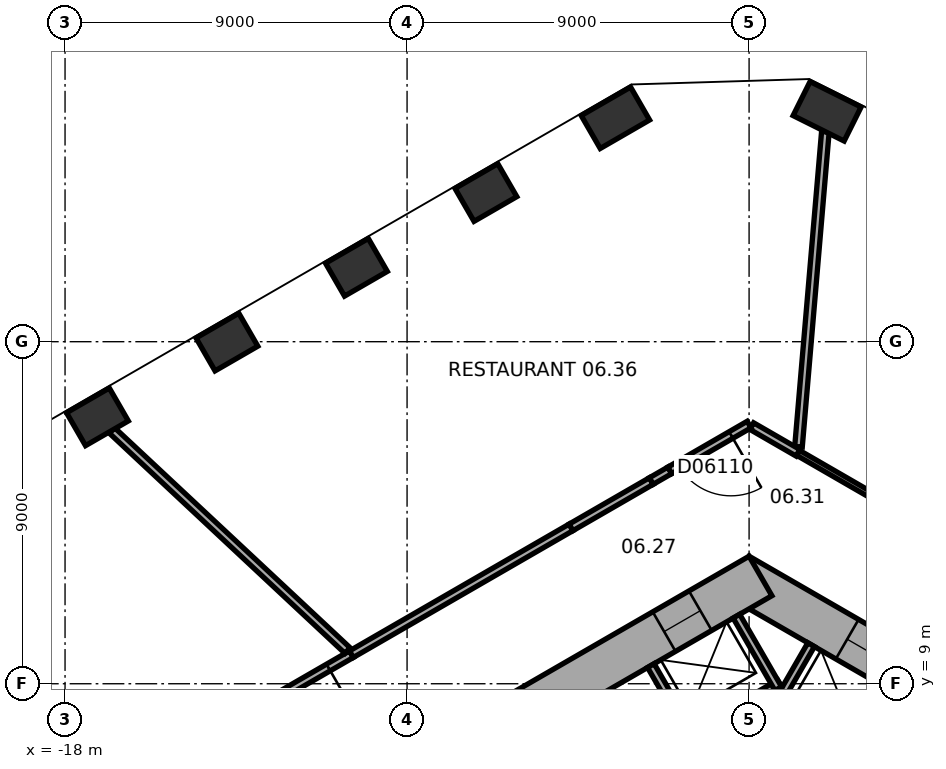
"""IFC4 building model, lengths in metres.
Left out: names, types, materials, properties, quantities, classifications, styles, units other than length and angle.
Written with IfcOpenShell. Run it as: python <this file> out.ifc"""

import sys

from ifc_helpers import new_model, si_unit, direction, frame, frame_2d, origin, origin_2d, place, context, subcontext, project, spatial, rectangle, extrude, element, fill, save


model = new_model("IFC4")
c1 = context("Model", 3, precision=1e-05, world=origin(), true_north=direction((0.0, 1.0)))
c2 = subcontext(c1, "Body", "Model", "MODEL_VIEW")
j1 = project(units=[si_unit("LENGTHUNIT", "METRE"), si_unit("PLANEANGLEUNIT", "RADIAN")], contexts=[c1])
p1 = place(None, origin())
s1 = spatial("IfcSite", under=j1, at=p1, CompositionType="ELEMENT")
p2 = place(p1, origin())
s2 = spatial("IfcBuilding", under=s1, at=p2, CompositionType="ELEMENT")
p3 = place(p2, frame((0.0, 0.0, 39.0)))
s3 = spatial("IfcBuildingStorey", under=s2, at=p3, CompositionType="ELEMENT", Elevation=39.0)
for number, where, z_axis, x_axis in (
    (1, (2.053, 24.062, 0.0), (0.0, 0.0, 1.0), (-0.895, 0.446, 0.0)),
    (2, (-3.518, 23.892, 0.0), (0.0, 0.0, 1.0), (-0.866, -0.5, 0.0)),
):
    element("IfcColumn", number, at=place(p3, frame(where, z_axis=z_axis, x_axis=x_axis)), inside=s3, PredefinedType="COLUMN", context=c2, shape_type="SweptSolid", body=[
        extrude(rectangle(XDim=1.5, YDim=1.0, at=origin_2d()), origin(), (0.0, 0.0, 1.0), 5.0),
    ])
for number, where, z_axis, x_axis in (
    (3, (-6.926, 21.925, 0.0), (0.0, 0.0, 1.0), (-0.866, -0.5, 0.0)),
    (4, (-10.333, 19.957, 0.0), (0.0, 0.0, 1.0), (-0.866, -0.5, 0.0)),
    (5, (-13.74, 17.99, 0.0), (0.0, 0.0, 1.0), (-0.866, -0.5, 0.0)),
    (6, (-17.148, 16.023, 0.0), (0.0, 0.0, 1.0), (-0.866, -0.5, 0.0)),
):
    element("IfcColumn", number, at=place(p3, frame(where, z_axis=z_axis, x_axis=x_axis)), inside=s3, PredefinedType="COLUMN", context=c2, shape_type="SweptSolid", body=[
        extrude(rectangle(XDim=1.3, YDim=1.0, at=origin_2d()), origin(), (0.0, 0.0, 1.0), 5.0),
    ])
p4 = place(p3, frame((10.4, 5.658, 0.0), z_axis=(0.0, 0.0, 1.0), x_axis=(-0.866021384402, 0.500006961711, 0.0)))
e7 = element("IfcWall", 7, at=p4, inside=s3, PredefinedType="SHEAR", context=c2, shape_type="SweptSolid", body=[
    extrude(rectangle(XDim=12.355, YDim=1.2, at=frame_2d((6.178, 0.0))), origin(), (0.0, 0.0, 1.0), 5.0),
])
p5 = place(p4, frame((2.728, 0.0, 0.0)))
e8 = element("IfcOpeningElement", 8, at=p5, cuts=e7, PredefinedType="OPENING", context=c2, shape_type="SweptSolid", body=[
    extrude(rectangle(XDim=1.1, YDim=2.1, at=frame_2d((0.55, 1.05))), frame((0.0, 0.61, 0.0), z_axis=(0.0, -1.0, 0.0), x_axis=(1.0, 0.0, 0.0)), (0.0, 0.0, 1.0), 1.22),
])
p6 = place(p4, frame((5.328, 0.0, 0.0)))
e9 = element("IfcOpeningElement", 9, at=p6, cuts=e7, PredefinedType="OPENING", context=c2, shape_type="SweptSolid", body=[
    extrude(rectangle(XDim=1.1, YDim=2.1, at=frame_2d((0.55, 1.05))), frame((0.0, 0.61, 0.0), z_axis=(0.0, -1.0, 0.0), x_axis=(1.0, 0.0, 0.0)), (0.0, 0.0, 1.0), 1.22),
])
p7 = place(p4, frame((7.928, 0.0, 0.0)))
e10 = element("IfcOpeningElement", 10, at=p7, cuts=e7, PredefinedType="OPENING", context=c2, shape_type="SweptSolid", body=[
    extrude(rectangle(XDim=1.1, YDim=2.1, at=frame_2d((0.55, 1.05))), frame((0.0, 0.61, 0.0), z_axis=(0.0, -1.0, 0.0), x_axis=(1.0, 0.0, 0.0)), (0.0, 0.0, 1.0), 1.22),
])
p8 = place(p3, frame((0.3, 11.836, 0.0), z_axis=(0.0, 0.0, 1.0), x_axis=(-0.866021384402, -0.500006961711, 0.0)))
e11 = element("IfcWall", 11, at=p8, inside=s3, PredefinedType="SHEAR", context=c2, shape_type="SweptSolid", body=[
    extrude(rectangle(XDim=12.355, YDim=1.2, at=frame_2d((6.178, 0.0))), origin(), (0.0, 0.0, 1.0), 5.0),
])
p9 = place(p8, frame((6.378, 0.0, 0.0)))
e12 = element("IfcOpeningElement", 12, at=p9, cuts=e11, PredefinedType="OPENING", context=c2, shape_type="SweptSolid", body=[
    extrude(rectangle(XDim=1.5, YDim=2.1, at=frame_2d((0.75, 1.05))), frame((0.0, 0.61, 0.0), z_axis=(0.0, -1.0, 0.0), x_axis=(1.0, 0.0, 0.0)), (0.0, 0.0, 1.0), 1.22),
])
p10 = place(p8, frame((1.828, 0.0, 0.0)))
e13 = element("IfcOpeningElement", 13, at=p10, cuts=e11, PredefinedType="OPENING", context=c2, shape_type="SweptSolid", body=[
    extrude(rectangle(XDim=1.1, YDim=2.1, at=frame_2d((0.55, 1.05))), frame((0.0, 0.61, 0.0), z_axis=(0.0, -1.0, 0.0), x_axis=(1.0, 0.0, 0.0)), (0.0, 0.0, 1.0), 1.22),
])
p11 = place(p3, frame((0.532, 8.122, 0.0), z_axis=(0.0, 0.0, 1.0), x_axis=(0.500077893725, 0.86598042715, 0.0)))
e14 = element("IfcWall", 14, at=p11, inside=s3, PredefinedType="PARTITIONING", context=c2, shape_type="SweptSolid", body=[
    extrude(rectangle(XDim=2.2, YDim=0.2, at=frame_2d((1.1, 0.0))), origin(), (0.0, 0.0, 1.0), 4.75),
])
p12 = place(p3, frame((0.803, 9.009, 0.0), z_axis=(0.0, 0.0, 1.0), x_axis=(-0.866028230842, -0.499995103361, 0.0)))
e15 = element("IfcWall", 15, at=p12, inside=s3, PredefinedType="PARTITIONING", context=c2, shape_type="SweptSolid", body=[
    extrude(rectangle(XDim=5.4, YDim=0.2, at=frame_2d((2.7, 0.0))), origin(), (0.0, 0.0, 1.0), 4.75),
])
p13 = place(p3, frame((0.767, 8.872, 0.0), z_axis=(0.0, 0.0, 1.0), x_axis=(-0.499994660107, 0.866028486751, 0.0)))
e16 = element("IfcWall", 16, at=p13, inside=s3, PredefinedType="PARTITIONING", context=c2, shape_type="SweptSolid", body=[
    extrude(rectangle(XDim=2.2, YDim=0.2, at=frame_2d((1.1, 0.0))), origin(), (0.0, 0.0, 1.0), 4.75),
])
p14 = place(p3, frame((-1.485, 7.572, 0.0), z_axis=(0.0, 0.0, 1.0), x_axis=(-0.50002983664, 0.866008176907, 0.0)))
e17 = element("IfcWall", 17, at=p14, inside=s3, PredefinedType="PARTITIONING", context=c2, shape_type="SweptSolid", body=[
    extrude(rectangle(XDim=2.2, YDim=0.2, at=frame_2d((1.1, 0.0))), origin(), (0.0, 0.0, 1.0), 4.75),
])
p15 = place(p3, frame((-10.465, 9.778, 0.0), z_axis=(0.0, 0.0, 1.0), x_axis=(-0.865998750002, -0.500046162864, 0.0)))
e18 = element("IfcWall", 18, at=p15, inside=s3, PredefinedType="PARTITIONING", context=c2, shape_type="SweptSolid", body=[
    extrude(rectangle(XDim=3.656, YDim=0.2, at=frame_2d((1.828, 0.0))), origin(), (0.0, 0.0, 1.0), 4.75),
])
p16 = place(p15, frame((0.7, 0.0, 0.0)))
e19 = element("IfcOpeningElement", 19, at=p16, cuts=e18, PredefinedType="OPENING", context=c2, shape_type="SweptSolid", body=[
    extrude(rectangle(XDim=1.6, YDim=2.4, at=frame_2d((0.8, 1.2))), frame((0.0, 0.11, 0.0), z_axis=(0.0, -1.0, 0.0), x_axis=(1.0, 0.0, 0.0)), (0.0, 0.0, 1.0), 0.22),
])
p17 = place(p3, frame((-10.465, 9.778, 0.0), z_axis=(0.0, 0.0, 1.0), x_axis=(0.866019272134, 0.50001062018, 0.0)))
e20 = element("IfcWall", 20, at=p17, inside=s3, PredefinedType="PARTITIONING", context=c2, shape_type="SweptSolid", body=[
    extrude(rectangle(XDim=6.674, YDim=0.2, at=frame_2d((3.337, 0.0))), origin(), (0.0, 0.0, 1.0), 4.75),
])
p18 = place(p3, frame((-10.567, 9.873, 0.0), z_axis=(0.0, 0.0, 1.0), x_axis=(-0.730670474687, 0.682730296252, 0.0)))
e21 = element("IfcWall", 21, at=p18, inside=s3, PredefinedType="PARTITIONING", context=c2, shape_type="SweptSolid", body=[
    extrude(rectangle(XDim=8.484, YDim=0.2, at=frame_2d((4.242, 0.0))), origin(), (0.0, 0.0, 1.0), 4.3),
])
p19 = place(p3, frame((-4.685, 13.115, 0.0), z_axis=(0.0, 0.0, 1.0), x_axis=(0.86602886455, 0.49999400573, 0.0)))
e22 = element("IfcWall", 22, at=p19, inside=s3, PredefinedType="PARTITIONING", context=c2, shape_type="SweptSolid", body=[
    extrude(rectangle(XDim=2.438, YDim=0.2, at=frame_2d((1.219, 0.0))), origin(), (0.0, 0.0, 1.0), 4.75),
])
p20 = place(p3, frame((-2.573, 14.334, 0.0), z_axis=(0.0, 0.0, 1.0), x_axis=(0.866040790738, 0.499973348067, 0.0)))
e23 = element("IfcWall", 23, at=p20, inside=s3, PredefinedType="PARTITIONING", context=c2, shape_type="SweptSolid", body=[
    extrude(rectangle(XDim=0.562, YDim=0.2, at=frame_2d((0.281, 0.0))), origin(), (0.0, 0.0, 1.0), 4.75),
])
p21 = place(p3, frame((1.287, 15.077, 0.0), z_axis=(0.0, 0.0, 1.0), x_axis=(0.865965872932, -0.500103096288, 0.0)))
e24 = element("IfcWall", 24, at=p21, inside=s3, PredefinedType="PARTITIONING", context=c2, shape_type="SweptSolid", body=[
    extrude(rectangle(XDim=2.424, YDim=0.15, at=frame_2d((1.212, 0.0))), origin(), (0.0, 0.0, 1.0), 4.75),
])
p22 = place(p3, frame((1.3, 15.236, 0.0), z_axis=(0.0, 0.0, 1.0), x_axis=(0.085009958898, 0.996380101612, 0.0)))
e25 = element("IfcWall", 25, at=p22, inside=s3, PredefinedType="PARTITIONING", context=c2, shape_type="SweptSolid", body=[
    extrude(rectangle(XDim=8.32, YDim=0.2, at=frame_2d((4.16, 0.0))), origin(), (0.0, 0.0, 1.0), 4.75),
])
p23 = place(p3, frame((0.069, 15.78, 0.0), z_axis=(0.0, 0.0, 1.0), x_axis=(0.866075676255, -0.499912915416, 0.0)))
e26 = element("IfcWall", 26, at=p23, inside=s3, PredefinedType="PARTITIONING", context=c2, shape_type="SweptSolid", body=[
    extrude(rectangle(XDim=1.406, YDim=0.2, at=frame_2d((0.703, 0.0))), origin(), (0.0, 0.0, 1.0), 4.75),
])
p24 = place(p3, frame((0.0, 15.82, 0.0), z_axis=(0.0, 0.0, 1.0), x_axis=(-0.86598987286, -0.500061536317, 0.0)))
e27 = element("IfcWall", 27, at=p24, inside=s3, PredefinedType="PARTITIONING", context=c2, shape_type="SweptSolid", body=[
    extrude(rectangle(XDim=2.41, YDim=0.2, at=frame_2d((1.205, 0.0))), origin(), (0.0, 0.0, 1.0), 4.75),
])
p25 = place(p24, frame((0.55, 0.0, 0.0)))
e28 = element("IfcOpeningElement", 28, at=p25, cuts=e27, PredefinedType="OPENING", context=c2, shape_type="SweptSolid", body=[
    extrude(rectangle(XDim=1.6, YDim=2.4, at=frame_2d((0.8, 1.2))), frame((0.0, 0.11, 0.0), z_axis=(0.0, -1.0, 0.0), x_axis=(1.0, 0.0, 0.0)), (0.0, 0.0, 1.0), 0.22),
])
p26 = place(p7, origin())
e29 = element("IfcDoor", 29, at=p26, inside=s3, OperationType="DOUBLE_DOOR_SLIDING", PredefinedType="DOOR", context=c2, shape_type="SweptSolid", body=[
    extrude(rectangle(XDim=1.1, YDim=2.1, at=frame_2d((0.55, 1.05))), frame((0.0, 0.025, 0.0), z_axis=(0.0, -1.0, 0.0), x_axis=(1.0, 0.0, 0.0)), (0.0, 0.0, 1.0), 0.05),
])
fill(e10, e29)
p27 = place(p10, origin())
e30 = element("IfcDoor", 30, at=p27, inside=s3, OperationType="DOUBLE_DOOR_SLIDING", PredefinedType="DOOR", context=c2, shape_type="SweptSolid", body=[
    extrude(rectangle(XDim=1.1, YDim=2.1, at=frame_2d((0.55, 1.05))), frame((0.0, 0.025, 0.0), z_axis=(0.0, -1.0, 0.0), x_axis=(1.0, 0.0, 0.0)), (0.0, 0.0, 1.0), 0.05),
])
fill(e13, e30)
p28 = place(p16, origin())
e31 = element("IfcDoor", 31, at=p28, inside=s3, OperationType="DOUBLE_DOOR_SINGLE_SWING", PredefinedType="DOOR", context=c2, shape_type="SweptSolid", body=[
    extrude(rectangle(XDim=1.6, YDim=2.4, at=frame_2d((0.8, 1.2))), frame((0.0, 0.025, 0.0), z_axis=(0.0, -1.0, 0.0), x_axis=(1.0, 0.0, 0.0)), (0.0, 0.0, 1.0), 0.05),
])
fill(e19, e31)
p29 = place(p25, origin())
e32 = element("IfcDoor", 32, at=p29, inside=s3, OperationType="DOUBLE_DOOR_SINGLE_SWING", PredefinedType="DOOR", context=c2, shape_type="SweptSolid", body=[
    extrude(rectangle(XDim=1.6, YDim=2.4, at=frame_2d((0.8, 1.2))), frame((0.0, 0.025, 0.0), z_axis=(0.0, -1.0, 0.0), x_axis=(1.0, 0.0, 0.0)), (0.0, 0.0, 1.0), 0.05),
])
fill(e28, e32)
save(model, sys.argv[1])
